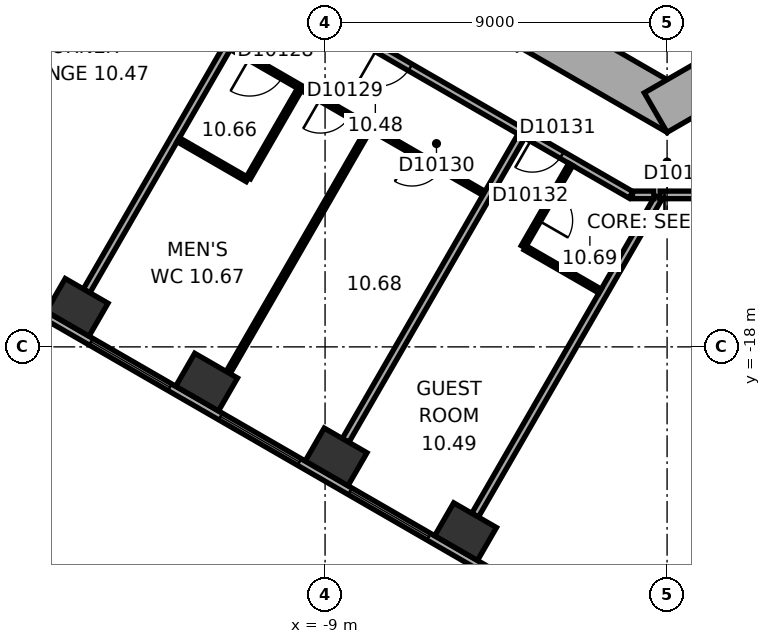
"""IFC4 building model, lengths in metres.
Left out: names, types, materials, properties, quantities, classifications, styles, units other than length and angle.
Written with IfcOpenShell. Run it as: python <this file> out.ifc"""

import sys

from ifc_helpers import new_model, si_unit, direction, frame, frame_2d, origin, origin_2d, place, context, subcontext, project, spatial, rectangle, extrude, element, fill, save


model = new_model("IFC4")
c1 = context("Model", 3, precision=1e-05, world=origin(), true_north=direction((0.0, 1.0)))
c2 = subcontext(c1, "Body", "Model", "MODEL_VIEW")
j1 = project(units=[si_unit("LENGTHUNIT", "METRE"), si_unit("PLANEANGLEUNIT", "RADIAN")], contexts=[c1])
p1 = place(None, origin())
s1 = spatial("IfcSite", under=j1, at=p1, CompositionType="ELEMENT")
p2 = place(p1, origin())
s2 = spatial("IfcBuilding", under=s1, at=p2, CompositionType="ELEMENT")
p3 = place(p2, frame((0.0, 0.0, 53.9)))
s3 = spatial("IfcBuildingStorey", under=s2, at=p3, CompositionType="ELEMENT", Elevation=53.9)
for number, where, z_axis, x_axis in (
    (1, (-15.524, -16.96, 0.0), (0.0, 0.0, 1.0), (0.866, -0.5, 0.0)),
    (2, (-12.117, -18.927, 0.0), (0.0, 0.0, 1.0), (0.866, -0.5, 0.0)),
    (3, (-8.71, -20.895, 0.0), (0.0, 0.0, 1.0), (0.866, -0.5, 0.0)),
    (4, (-5.302, -22.862, 0.0), (0.0, 0.0, 1.0), (0.866, -0.5, 0.0)),
):
    element("IfcColumn", number, at=place(p3, frame(where, z_axis=z_axis, x_axis=x_axis)), inside=s3, PredefinedType="COLUMN", context=c2, shape_type="SweptSolid", body=[
        extrude(rectangle(XDim=1.3, YDim=1.0, at=origin_2d()), origin(), (0.0, 0.0, 1.0), 3.3),
    ])
p4 = place(p3, frame((-10.4, -5.658, 0.0), z_axis=(0.0, 0.0, 1.0), x_axis=(0.866021384402, -0.500006961711, 0.0)))
e5 = element("IfcWall", 5, at=p4, inside=s3, PredefinedType="SHEAR", context=c2, shape_type="SweptSolid", body=[
    extrude(rectangle(XDim=12.355, YDim=1.2, at=frame_2d((6.178, 0.0))), origin(), (0.0, 0.0, 1.0), 3.3),
])
p5 = place(p4, frame((6.378, 0.0, 0.0)))
e6 = element("IfcOpeningElement", 6, at=p5, cuts=e5, PredefinedType="OPENING", context=c2, shape_type="SweptSolid", body=[
    extrude(rectangle(XDim=1.5, YDim=2.1, at=frame_2d((0.75, 1.05))), frame((0.0, 0.61, 0.0), z_axis=(0.0, -1.0, 0.0), x_axis=(1.0, 0.0, 0.0)), (0.0, 0.0, 1.0), 1.22),
])
p6 = place(p4, frame((1.928, 0.0, 0.0)))
e7 = element("IfcOpeningElement", 7, at=p6, cuts=e5, PredefinedType="OPENING", context=c2, shape_type="SweptSolid", body=[
    extrude(rectangle(XDim=0.9, YDim=2.1, at=frame_2d((0.45, 1.05))), frame((0.0, 0.61, 0.0), z_axis=(0.0, -1.0, 0.0), x_axis=(1.0, 0.0, 0.0)), (0.0, 0.0, 1.0), 1.22),
])
p7 = place(p4, frame((4.528, 0.0, 0.0)))
e8 = element("IfcOpeningElement", 8, at=p7, cuts=e5, PredefinedType="OPENING", context=c2, shape_type="SweptSolid", body=[
    extrude(rectangle(XDim=0.9, YDim=2.1, at=frame_2d((0.45, 1.05))), frame((0.0, 0.61, 0.0), z_axis=(0.0, -1.0, 0.0), x_axis=(1.0, 0.0, 0.0)), (0.0, 0.0, 1.0), 1.22),
])
p8 = place(p3, frame((-0.3, -11.836, 0.0), z_axis=(0.0, 0.0, 1.0), x_axis=(0.866021384402, 0.500006961711, 0.0)))
e9 = element("IfcWall", 9, at=p8, inside=s3, PredefinedType="SHEAR", context=c2, shape_type="SweptSolid", body=[
    extrude(rectangle(XDim=12.355, YDim=1.2, at=frame_2d((6.178, 0.0))), origin(), (0.0, 0.0, 1.0), 3.3),
])
p9 = place(p8, frame((4.128, 0.0, 0.0)))
e10 = element("IfcOpeningElement", 10, at=p9, cuts=e9, PredefinedType="OPENING", context=c2, shape_type="SweptSolid", body=[
    extrude(rectangle(XDim=0.9, YDim=2.1, at=frame_2d((0.45, 1.05))), frame((0.0, 0.61, 0.0), z_axis=(0.0, -1.0, 0.0), x_axis=(1.0, 0.0, 0.0)), (0.0, 0.0, 1.0), 1.22),
])
p10 = place(p8, frame((7.928, 0.0, 0.0)))
e11 = element("IfcOpeningElement", 11, at=p10, cuts=e9, PredefinedType="OPENING", context=c2, shape_type="SweptSolid", body=[
    extrude(rectangle(XDim=1.1, YDim=2.1, at=frame_2d((0.55, 1.05))), frame((0.0, 0.61, 0.0), z_axis=(0.0, -1.0, 0.0), x_axis=(1.0, 0.0, 0.0)), (0.0, 0.0, 1.0), 1.22),
])
p11 = place(p3, frame((-19.914, -15.119, 0.0), z_axis=(0.0, 0.0, 1.0), x_axis=(0.866025418898, -0.499999973822, 0.0)))
e12 = element("IfcWall", 12, at=p11, inside=s3, PredefinedType="STANDARD", context=c2, shape_type="SweptSolid", body=[
    extrude(rectangle(XDim=21.246, YDim=0.2, at=frame_2d((10.623, 0.0))), origin(), (0.0, 0.0, 1.0), 3.3),
])
p12 = place(p11, frame((1.555, 0.0, 0.8)))
e13 = element("IfcOpeningElement", 13, at=p12, cuts=e12, PredefinedType="OPENING", context=c2, shape_type="SweptSolid", body=[
    extrude(rectangle(XDim=2.4, YDim=1.7, at=frame_2d((1.2, 0.85))), frame((0.0, 0.11, 0.0), z_axis=(0.0, -1.0, 0.0), x_axis=(1.0, 0.0, 0.0)), (0.0, 0.0, 1.0), 0.22),
])
p13 = place(p11, frame((5.489, 0.0, 0.8)))
e14 = element("IfcOpeningElement", 14, at=p13, cuts=e12, PredefinedType="OPENING", context=c2, shape_type="SweptSolid", body=[
    extrude(rectangle(XDim=2.4, YDim=1.7, at=frame_2d((1.2, 0.85))), frame((0.0, 0.11, 0.0), z_axis=(0.0, -1.0, 0.0), x_axis=(1.0, 0.0, 0.0)), (0.0, 0.0, 1.0), 0.22),
])
p14 = place(p11, frame((9.424, 0.0, 0.8)))
e15 = element("IfcOpeningElement", 15, at=p14, cuts=e12, PredefinedType="OPENING", context=c2, shape_type="SweptSolid", body=[
    extrude(rectangle(XDim=2.4, YDim=1.7, at=frame_2d((1.2, 0.85))), frame((0.0, 0.11, 0.0), z_axis=(0.0, -1.0, 0.0), x_axis=(1.0, 0.0, 0.0)), (0.0, 0.0, 1.0), 0.22),
])
p15 = place(p11, frame((13.358, 0.0, 0.8)))
e16 = element("IfcOpeningElement", 16, at=p15, cuts=e12, PredefinedType="OPENING", context=c2, shape_type="SweptSolid", body=[
    extrude(rectangle(XDim=2.4, YDim=1.7, at=frame_2d((1.2, 0.85))), frame((0.0, 0.11, 0.0), z_axis=(0.0, -1.0, 0.0), x_axis=(1.0, 0.0, 0.0)), (0.0, 0.0, 1.0), 0.22),
])
p16 = place(p11, frame((17.293, 0.0, 0.8)))
e17 = element("IfcOpeningElement", 17, at=p16, cuts=e12, PredefinedType="OPENING", context=c2, shape_type="SweptSolid", body=[
    extrude(rectangle(XDim=2.4, YDim=1.7, at=frame_2d((1.2, 0.85))), frame((0.0, 0.11, 0.0), z_axis=(0.0, -1.0, 0.0), x_axis=(1.0, 0.0, 0.0)), (0.0, 0.0, 1.0), 0.22),
])
p17 = place(p3, frame((0.013, -8.422, 0.0), z_axis=(0.0, 0.0, 1.0), x_axis=(0.500077893725, -0.86598042715, 0.0)))
e18 = element("IfcWall", 18, at=p17, inside=s3, PredefinedType="PARTITIONING", context=c2, shape_type="SweptSolid", body=[
    extrude(rectangle(XDim=2.2, YDim=0.2, at=frame_2d((1.1, 0.0))), origin(), (0.0, 0.0, 1.0), 3.05),
])
p18 = place(p3, frame((-15.274, -16.527, 0.0), z_axis=(0.0, 0.0, 1.0), x_axis=(0.49998823431, 0.866032196602, 0.0)))
e19 = element("IfcWall", 19, at=p18, inside=s3, PredefinedType="PARTITIONING", context=c2, shape_type="SweptSolid", body=[
    extrude(rectangle(XDim=9.25, YDim=0.2, at=frame_2d((4.625, 0.0))), origin(), (0.0, 0.0, 1.0), 3.05),
])
p19 = place(p3, frame((-12.863, -12.55, 0.0), z_axis=(0.0, 0.0, 1.0), x_axis=(0.866009402589, -0.500027713859, 0.0)))
e20 = element("IfcWall", 20, at=p19, inside=s3, PredefinedType="PARTITIONING", context=c2, shape_type="SweptSolid", body=[
    extrude(rectangle(XDim=2.1, YDim=0.12, at=frame_2d((1.05, 0.0))), origin(), (0.0, 0.0, 1.0), 3.05),
])
p20 = place(p3, frame((-11.615, -7.843, 0.0), z_axis=(0.0, 0.0, 1.0), x_axis=(0.866026466995, -0.499998158461, 0.0)))
e21 = element("IfcWall", 21, at=p20, inside=s3, PredefinedType="PARTITIONING", context=c2, shape_type="SweptSolid", body=[
    extrude(rectangle(XDim=12.315, YDim=0.2, at=frame_2d((6.158, 0.0))), origin(), (0.0, 0.0, 1.0), 3.05),
])
p21 = place(p20, frame((4.608, 0.0, 0.0)))
e22 = element("IfcOpeningElement", 22, at=p21, cuts=e21, PredefinedType="OPENING", context=c2, shape_type="SweptSolid", body=[
    extrude(rectangle(XDim=1.0, YDim=2.1, at=frame_2d((0.5, 1.05))), frame((0.0, 0.11, 0.0), z_axis=(0.0, -1.0, 0.0), x_axis=(1.0, 0.0, 0.0)), (0.0, 0.0, 1.0), 0.22),
])
p22 = place(p20, frame((9.317, 0.0, 0.0)))
e23 = element("IfcOpeningElement", 23, at=p22, cuts=e21, PredefinedType="OPENING", context=c2, shape_type="SweptSolid", body=[
    extrude(rectangle(XDim=0.9, YDim=2.1, at=frame_2d((0.45, 1.05))), frame((0.0, 0.11, 0.0), z_axis=(0.0, -1.0, 0.0), x_axis=(1.0, 0.0, 0.0)), (0.0, 0.0, 1.0), 0.22),
])
p23 = place(p3, frame((-11.551, -18.677, 0.0), z_axis=(0.0, 0.0, 1.0), x_axis=(0.500008425378, 0.866020539336, 0.0)))
e24 = element("IfcWall", 24, at=p23, inside=s3, PredefinedType="PARTITIONING", context=c2, shape_type="SweptSolid", body=[
    extrude(rectangle(XDim=7.39, YDim=0.12, at=frame_2d((3.695, 0.0))), origin(), (0.0, 0.0, 1.0), 2.6),
])
p24 = place(p3, frame((-11.463, -10.125, 0.0), z_axis=(0.0, 0.0, 1.0), x_axis=(0.866014882148, -0.500018223566, 0.0)))
e25 = element("IfcWall", 25, at=p24, inside=s3, PredefinedType="PARTITIONING", context=c2, shape_type="SweptSolid", body=[
    extrude(rectangle(XDim=7.669, YDim=0.12, at=frame_2d((3.834, 0.0))), origin(), (0.0, 0.0, 1.0), 3.05),
])
p25 = place(p24, frame((0.55, 0.0, 0.0)))
e26 = element("IfcOpeningElement", 26, at=p25, cuts=e25, PredefinedType="OPENING", context=c2, shape_type="SweptSolid", body=[
    extrude(rectangle(XDim=1.0, YDim=2.1, at=frame_2d((0.5, 1.05))), frame((0.0, 0.07, 0.0), z_axis=(0.0, -1.0, 0.0), x_axis=(1.0, 0.0, 0.0)), (0.0, 0.0, 1.0), 0.14),
])
p26 = place(p24, frame((2.7, 0.0, 0.0)))
e27 = element("IfcOpeningElement", 27, at=p26, cuts=e25, PredefinedType="OPENING", context=c2, shape_type="SweptSolid", body=[
    extrude(rectangle(XDim=0.9, YDim=2.1, at=frame_2d((0.45, 1.05))), frame((0.0, 0.07, 0.0), z_axis=(0.0, -1.0, 0.0), x_axis=(1.0, 0.0, 0.0)), (0.0, 0.0, 1.0), 0.14),
])
p27 = place(p24, frame((5.485, 0.0, 0.0)))
e28 = element("IfcOpeningElement", 28, at=p27, cuts=e25, PredefinedType="OPENING", context=c2, shape_type="SweptSolid", body=[
    extrude(rectangle(XDim=0.9, YDim=2.1, at=frame_2d((0.45, 1.05))), frame((0.0, 0.07, 0.0), z_axis=(0.0, -1.0, 0.0), x_axis=(1.0, 0.0, 0.0)), (0.0, 0.0, 1.0), 0.14),
])
p28 = place(p3, frame((-11.014, -13.548, 0.0), z_axis=(0.0, 0.0, 1.0), x_axis=(0.499980071345, 0.866036909293, 0.0)))
e29 = element("IfcWall", 29, at=p28, inside=s3, PredefinedType="PARTITIONING", context=c2, shape_type="SweptSolid", body=[
    extrude(rectangle(XDim=2.68, YDim=0.12, at=frame_2d((1.34, 0.0))), origin(), (0.0, 0.0, 1.0), 3.05),
])
p29 = place(p3, frame((-8.46, -20.461, 0.0), z_axis=(0.0, 0.0, 1.0), x_axis=(0.499999662836, 0.866025598446, 0.0)))
e30 = element("IfcWall", 30, at=p29, inside=s3, PredefinedType="PARTITIONING", context=c2, shape_type="SweptSolid", body=[
    extrude(rectangle(XDim=9.25, YDim=0.2, at=frame_2d((4.625, 0.0))), origin(), (0.0, 0.0, 1.0), 3.05),
])
p30 = place(p3, frame((-5.052, -22.429, 0.0), z_axis=(0.0, 0.0, 1.0), x_axis=(0.50000569793, 0.866022114058, 0.0)))
e31 = element("IfcWall", 31, at=p30, inside=s3, PredefinedType="PARTITIONING", context=c2, shape_type="SweptSolid", body=[
    extrude(rectangle(XDim=9.65, YDim=0.2, at=frame_2d((4.825, 0.0))), origin(), (0.0, 0.0, 1.0), 3.05),
])
p31 = place(p3, frame((-3.786, -15.366, 0.0), z_axis=(0.0, 0.0, 1.0), x_axis=(0.500004234368, 0.866022959057, 0.0)))
e32 = element("IfcWall", 32, at=p31, inside=s3, PredefinedType="PARTITIONING", context=c2, shape_type="SweptSolid", body=[
    extrude(rectangle(XDim=2.5, YDim=0.12, at=frame_2d((1.25, 0.0))), origin(), (0.0, 0.0, 1.0), 3.05),
])
p32 = place(p31, frame((0.8, 0.0, 0.0)))
e33 = element("IfcOpeningElement", 33, at=p32, cuts=e32, PredefinedType="OPENING", context=c2, shape_type="SweptSolid", body=[
    extrude(rectangle(XDim=0.9, YDim=2.1, at=frame_2d((0.45, 1.05))), frame((0.0, 0.07, 0.0), z_axis=(0.0, -1.0, 0.0), x_axis=(1.0, 0.0, 0.0)), (0.0, 0.0, 1.0), 0.14),
])
p33 = place(p3, frame((-1.764, -16.533, 0.0), z_axis=(0.0, 0.0, 1.0), x_axis=(-0.866008641419, 0.500029032144, 0.0)))
e34 = element("IfcWall", 34, at=p33, inside=s3, PredefinedType="PARTITIONING", context=c2, shape_type="SweptSolid", body=[
    extrude(rectangle(XDim=2.275, YDim=0.12, at=frame_2d((1.137, 0.0))), origin(), (0.0, 0.0, 1.0), 3.05),
])
p34 = place(p3, frame((-0.91, -14.001, 0.0), z_axis=(0.0, 0.0, 1.0), x_axis=(1.0, 0.0, 0.0)))
e35 = element("IfcWall", 35, at=p34, inside=s3, PredefinedType="PARTITIONING", context=c2, shape_type="SweptSolid", body=[
    extrude(rectangle(XDim=0.56, YDim=0.2, at=frame_2d((0.28, 0.0))), origin(), (0.0, 0.0, 1.0), 3.05),
])
p35 = place(p3, frame((-0.186, -14.001, 0.0), z_axis=(0.0, 0.0, 1.0), x_axis=(1.0, 0.0, 0.0)))
e36 = element("IfcWall", 36, at=p35, inside=s3, PredefinedType="PARTITIONING", context=c2, shape_type="SweptSolid", body=[
    extrude(rectangle(XDim=1.136, YDim=0.2, at=frame_2d((0.568, 0.0))), origin(), (0.0, 0.0, 1.0), 3.05),
])
p36 = place(p35, frame((0.118, 0.0, 0.0)))
e37 = element("IfcOpeningElement", 37, at=p36, cuts=e36, PredefinedType="OPENING", context=c2, shape_type="SweptSolid", body=[
    extrude(rectangle(XDim=0.9, YDim=2.1, at=frame_2d((0.45, 1.05))), frame((0.0, 0.11, 0.0), z_axis=(0.0, -1.0, 0.0), x_axis=(1.0, 0.0, 0.0)), (0.0, 0.0, 1.0), 0.22),
])
p37 = place(p13, origin())
e38 = element("IfcWindow", 38, at=p37, inside=s3, PartitioningType="SINGLE_PANEL", PredefinedType="WINDOW", context=c2, shape_type="SweptSolid", body=[
    extrude(rectangle(XDim=2.4, YDim=1.7, at=frame_2d((1.2, 0.85))), frame((0.0, 0.03, 0.0), z_axis=(0.0, -1.0, 0.0), x_axis=(1.0, 0.0, 0.0)), (0.0, 0.0, 1.0), 0.06),
])
fill(e14, e38)
p38 = place(p14, origin())
e39 = element("IfcWindow", 39, at=p38, inside=s3, PartitioningType="SINGLE_PANEL", PredefinedType="WINDOW", context=c2, shape_type="SweptSolid", body=[
    extrude(rectangle(XDim=2.4, YDim=1.7, at=frame_2d((1.2, 0.85))), frame((0.0, 0.03, 0.0), z_axis=(0.0, -1.0, 0.0), x_axis=(1.0, 0.0, 0.0)), (0.0, 0.0, 1.0), 0.06),
])
fill(e15, e39)
p39 = place(p15, origin())
e40 = element("IfcWindow", 40, at=p39, inside=s3, PartitioningType="SINGLE_PANEL", PredefinedType="WINDOW", context=c2, shape_type="SweptSolid", body=[
    extrude(rectangle(XDim=2.4, YDim=1.7, at=frame_2d((1.2, 0.85))), frame((0.0, 0.03, 0.0), z_axis=(0.0, -1.0, 0.0), x_axis=(1.0, 0.0, 0.0)), (0.0, 0.0, 1.0), 0.06),
])
fill(e16, e40)
p40 = place(p21, origin())
e41 = element("IfcDoor", 41, at=p40, inside=s3, OperationType="SINGLE_SWING_LEFT", PredefinedType="DOOR", context=c2, shape_type="SweptSolid", body=[
    extrude(rectangle(XDim=1.0, YDim=2.1, at=frame_2d((0.5, 1.05))), frame((0.0, 0.025, 0.0), z_axis=(0.0, -1.0, 0.0), x_axis=(1.0, 0.0, 0.0)), (0.0, 0.0, 1.0), 0.05),
])
fill(e22, e41)
p41 = place(p25, origin())
e42 = element("IfcDoor", 42, at=p41, inside=s3, OperationType="SINGLE_SWING_LEFT", PredefinedType="DOOR", context=c2, shape_type="SweptSolid", body=[
    extrude(rectangle(XDim=1.0, YDim=2.1, at=frame_2d((0.5, 1.05))), frame((0.0, 0.025, 0.0), z_axis=(0.0, -1.0, 0.0), x_axis=(1.0, 0.0, 0.0)), (0.0, 0.0, 1.0), 0.05),
])
fill(e26, e42)
p42 = place(p26, origin())
e43 = element("IfcDoor", 43, at=p42, inside=s3, OperationType="SINGLE_SWING_LEFT", PredefinedType="DOOR", context=c2, shape_type="SweptSolid", body=[
    extrude(rectangle(XDim=0.9, YDim=2.1, at=frame_2d((0.45, 1.05))), frame((0.0, 0.025, 0.0), z_axis=(0.0, -1.0, 0.0), x_axis=(1.0, 0.0, 0.0)), (0.0, 0.0, 1.0), 0.05),
])
fill(e27, e43)
p43 = place(p27, origin())
e44 = element("IfcDoor", 44, at=p43, inside=s3, OperationType="SINGLE_SWING_LEFT", PredefinedType="DOOR", context=c2, shape_type="SweptSolid", body=[
    extrude(rectangle(XDim=0.9, YDim=2.1, at=frame_2d((0.45, 1.05))), frame((0.0, 0.025, 0.0), z_axis=(0.0, -1.0, 0.0), x_axis=(1.0, 0.0, 0.0)), (0.0, 0.0, 1.0), 0.05),
])
fill(e28, e44)
p44 = place(p22, origin())
e45 = element("IfcDoor", 45, at=p44, inside=s3, OperationType="SINGLE_SWING_LEFT", PredefinedType="DOOR", context=c2, shape_type="SweptSolid", body=[
    extrude(rectangle(XDim=0.9, YDim=2.1, at=frame_2d((0.45, 1.05))), frame((0.0, 0.025, 0.0), z_axis=(0.0, -1.0, 0.0), x_axis=(1.0, 0.0, 0.0)), (0.0, 0.0, 1.0), 0.05),
])
fill(e23, e45)
p45 = place(p32, origin())
e46 = element("IfcDoor", 46, at=p45, inside=s3, OperationType="SINGLE_SWING_LEFT", PredefinedType="DOOR", context=c2, shape_type="SweptSolid", body=[
    extrude(rectangle(XDim=0.9, YDim=2.1, at=frame_2d((0.45, 1.05))), frame((0.0, 0.025, 0.0), z_axis=(0.0, -1.0, 0.0), x_axis=(1.0, 0.0, 0.0)), (0.0, 0.0, 1.0), 0.05),
])
fill(e33, e46)
p46 = place(p36, origin())
e47 = element("IfcDoor", 47, at=p46, inside=s3, OperationType="SINGLE_SWING_LEFT", PredefinedType="DOOR", context=c2, shape_type="SweptSolid", body=[
    extrude(rectangle(XDim=0.9, YDim=2.1, at=frame_2d((0.45, 1.05))), frame((0.0, 0.025, 0.0), z_axis=(0.0, -1.0, 0.0), x_axis=(1.0, 0.0, 0.0)), (0.0, 0.0, 1.0), 0.05),
])
fill(e37, e47)
save(model, sys.argv[1])
